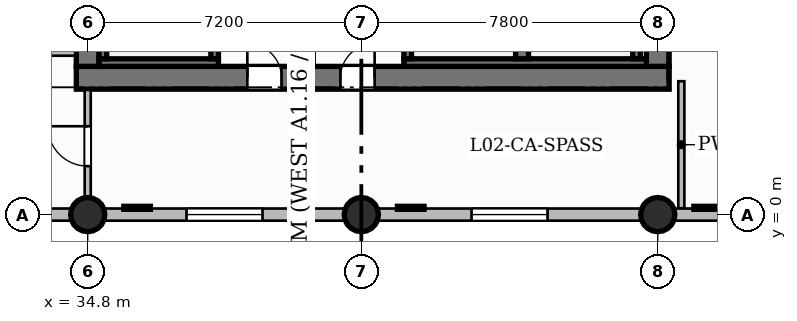
"""IFC4 building model, lengths in metres.
Left out: names, types, materials, properties, quantities, classifications, styles, units other than length and angle.
Written with IfcOpenShell. Run it as: python <this file> out.ifc"""

import sys

from ifc_helpers import new_model, si_unit, direction, frame, frame_2d, origin, origin_2d, place, context, subcontext, project, spatial, rectangle, circle, extrude, source, transform, mapped, element, fill, save


model = new_model("IFC4")
c1 = context("Model", 3, precision=1e-05, world=origin(), true_north=direction((0.0, 1.0)))
c2 = subcontext(c1, "Body", "Model", "MODEL_VIEW")
j1 = project(units=[si_unit("LENGTHUNIT", "METRE"), si_unit("PLANEANGLEUNIT", "RADIAN")], contexts=[c1])
p1 = place(None, origin())
s1 = spatial("IfcSite", under=j1, at=p1, CompositionType="ELEMENT")
p2 = place(p1, origin())
s2 = spatial("IfcBuilding", under=s1, at=p2, CompositionType="ELEMENT")
p3 = place(p2, frame((0.0, 0.0, 10.8)))
s3 = spatial("IfcBuildingStorey", under=s2, at=p3, CompositionType="ELEMENT", Elevation=10.8)
p4 = place(p3, frame((34.5, 3.6, 0.0), z_axis=(0.0, 0.0, 1.0), x_axis=(1.0, 0.0, 0.0)))
e1 = element("IfcWall", 1, at=p4, inside=s3, PredefinedType="SHEAR", context=c2, shape_type="SweptSolid", body=[
    extrude(rectangle(XDim=15.6, YDim=0.6, at=frame_2d((7.8, 0.0))), origin(), (0.0, 0.0, 1.0), 5.4),
])
p5 = place(p4, frame((4.5, 0.0, 0.0)))
e2 = element("IfcOpeningElement", 2, at=p5, cuts=e1, PredefinedType="OPENING", context=c2, shape_type="SweptSolid", body=[
    extrude(rectangle(XDim=0.9, YDim=2.1, at=frame_2d((0.45, 1.05))), frame((0.0, 0.31, 0.0), z_axis=(0.0, -1.0, 0.0), x_axis=(1.0, 0.0, 0.0)), (0.0, 0.0, 1.0), 0.62),
])
p6 = place(p4, frame((6.95, 0.0, 0.0)))
e3 = element("IfcOpeningElement", 3, at=p6, cuts=e1, PredefinedType="OPENING", context=c2, shape_type="SweptSolid", body=[
    extrude(rectangle(XDim=0.9, YDim=2.1, at=frame_2d((0.45, 1.05))), frame((0.0, 0.31, 0.0), z_axis=(0.0, -1.0, 0.0), x_axis=(1.0, 0.0, 0.0)), (0.0, 0.0, 1.0), 0.62),
])
for number, where, z_axis, x_axis in (
    (4, (34.8, 3.9, 0.0), (0.0, 0.0, 1.0), (0.0, 1.0, 0.0)),
    (5, (49.8, 3.9, 0.0), (0.0, 0.0, 1.0), (0.0, 1.0, 0.0)),
):
    element("IfcWall", number, at=place(p3, frame(where, z_axis=z_axis, x_axis=x_axis)), inside=s3, PredefinedType="SHEAR", context=c2, shape_type="SweptSolid", body=[
        extrude(rectangle(XDim=10.2, YDim=0.6, at=frame_2d((5.1, 0.0))), origin(), (0.0, 0.0, 1.0), 5.4),
    ])
m1 = source(origin(), c2, "Body", "SweptSolid", [
    extrude(circle(Radius=0.45, at=origin_2d()), origin(), (0.0, 0.0, 1.0), 5.4),
])
for number, where, z_axis, x_axis in (
    (6, (34.8, 0.0, 0.0), (0.0, 0.0, 1.0), (1.0, 0.0, 0.0)),
    (7, (42.0, 0.0, 0.0), (0.0, 0.0, 1.0), (1.0, 0.0, 0.0)),
    (8, (49.8, 0.0, 0.0), (0.0, 0.0, 1.0), (1.0, 0.0, 0.0)),
):
    element("IfcColumn", number, at=place(p3, frame(where, z_axis=z_axis, x_axis=x_axis)), inside=s3, PredefinedType="COLUMN", context=c2, shape_type="MappedRepresentation", body=[
        mapped(m1, transform((0.0, 0.0, 0.0), scale=1.0)),
    ])
p7 = place(p3, frame((35.1, 4.0, 0.0), z_axis=(0.0, 0.0, 1.0), x_axis=(1.0, 0.0, 0.0)))
e9 = element("IfcWall", 9, at=p7, inside=s3, PredefinedType="SHEAR", context=c2, shape_type="SweptSolid", body=[
    extrude(rectangle(XDim=3.14, YDim=0.2, at=frame_2d((1.57, 0.0))), origin(), (0.0, 0.0, 1.0), 5.4),
])
for number, where, z_axis, x_axis in (
    (10, (35.2, 4.1, 0.0), (0.0, 0.0, 1.0), (0.0, 1.0, 0.0)),
    (11, (38.14, 4.1, 0.0), (0.0, 0.0, 1.0), (0.0, 1.0, 0.0)),
):
    element("IfcWall", number, at=place(p3, frame(where, z_axis=z_axis, x_axis=x_axis)), inside=s3, PredefinedType="SHEAR", context=c2, shape_type="SweptSolid", body=[
        extrude(rectangle(XDim=6.95, YDim=0.2, at=frame_2d((3.475, 0.0))), origin(), (0.0, 0.0, 1.0), 5.4),
    ])
p8 = place(p3, frame((43.12, 4.0, 0.0), z_axis=(0.0, 0.0, 1.0), x_axis=(1.0, 0.0, 0.0)))
e12 = element("IfcWall", 12, at=p8, inside=s3, PredefinedType="SHEAR", context=c2, shape_type="SweptSolid", body=[
    extrude(rectangle(XDim=6.38, YDim=0.2, at=frame_2d((3.19, 0.0))), origin(), (0.0, 0.0, 1.0), 5.4),
])
p9 = place(p3, frame((43.22, 4.1, 0.0), z_axis=(0.0, 0.0, 1.0), x_axis=(0.0, 1.0, 0.0)))
e13 = element("IfcWall", 13, at=p9, inside=s3, PredefinedType="SHEAR", context=c2, shape_type="SweptSolid", body=[
    extrude(rectangle(XDim=6.95, YDim=0.2, at=frame_2d((3.475, 0.0))), origin(), (0.0, 0.0, 1.0), 5.4),
])
p10 = place(p3, frame((46.23, 4.1, 0.0), z_axis=(0.0, 0.0, 1.0), x_axis=(0.0, 1.0, 0.0)))
e14 = element("IfcWall", 14, at=p10, inside=s3, PredefinedType="SHEAR", context=c2, shape_type="SweptSolid", body=[
    extrude(rectangle(XDim=6.95, YDim=0.34, at=frame_2d((3.475, 0.0))), origin(), (0.0, 0.0, 1.0), 5.4),
])
p11 = place(p3, frame((49.24, 4.1, 0.0), z_axis=(0.0, 0.0, 1.0), x_axis=(0.0, 1.0, 0.0)))
e15 = element("IfcWall", 15, at=p11, inside=s3, PredefinedType="SHEAR", context=c2, shape_type="SweptSolid", body=[
    extrude(rectangle(XDim=6.95, YDim=0.2, at=frame_2d((3.475, 0.0))), origin(), (0.0, 0.0, 1.0), 5.4),
])
p12 = place(p3, frame((40.7, 3.92, 0.0), z_axis=(0.0, 0.0, 1.0), x_axis=(0.0, 1.0, 0.0)))
e16 = element("IfcWall", 16, at=p12, inside=s3, PredefinedType="PARTITIONING", context=c2, shape_type="SweptSolid", body=[
    extrude(rectangle(XDim=3.99, YDim=0.14, at=frame_2d((1.995, 0.0))), origin(), (0.0, 0.0, 1.0), 5.1),
])
p13 = place(p3, frame((32.16, 4.28, 0.0), z_axis=(0.0, 0.0, 1.0), x_axis=(1.0, 0.0, 0.0)))
e17 = element("IfcWall", 17, at=p13, inside=s3, PredefinedType="PARTITIONING", context=c2, shape_type="SweptSolid", body=[
    extrude(rectangle(XDim=2.31, YDim=0.2, at=frame_2d((1.155, 0.0))), origin(), (0.0, 0.0, 1.0), 5.1),
])
p14 = place(p3, frame((34.8, 0.32, 0.0), z_axis=(0.0, 0.0, 1.0), x_axis=(0.0, 1.0, 0.0)))
e18 = element("IfcWall", 18, at=p14, inside=s3, PredefinedType="PARTITIONING", context=c2, shape_type="SweptSolid", body=[
    extrude(rectangle(XDim=2.96, YDim=0.16, at=frame_2d((1.48, 0.0))), origin(), (0.0, 0.0, 1.0), 5.1),
])
p15 = place(p14, frame((0.955, 0.0, 0.0)))
e19 = element("IfcOpeningElement", 19, at=p15, cuts=e18, PredefinedType="OPENING", context=c2, shape_type="SweptSolid", body=[
    extrude(rectangle(XDim=1.05, YDim=2.15, at=frame_2d((0.525, 1.075))), frame((0.0, 0.09, 0.0), z_axis=(0.0, -1.0, 0.0), x_axis=(1.0, 0.0, 0.0)), (0.0, 0.0, 1.0), 0.18),
])
p16 = place(p3, frame((50.42, 0.168, 0.0), z_axis=(0.0, 0.0, 1.0), x_axis=(0.0, 1.0, 0.0)))
e20 = element("IfcWall", 20, at=p16, inside=s3, PredefinedType="PARTITIONING", context=c2, shape_type="SweptSolid", body=[
    extrude(rectangle(XDim=3.342, YDim=0.16, at=frame_2d((1.671, 0.0))), origin(), (0.0, 0.0, 1.0), 5.1),
])
p17 = place(p3, frame((28.35, 0.0, 0.0), z_axis=(0.0, 0.0, 1.0), x_axis=(1.0, 0.0, 0.0)))
e21 = element("IfcWall", 21, at=p17, inside=s3, PredefinedType="SOLIDWALL", context=c2, shape_type="SweptSolid", body=[
    extrude(rectangle(XDim=52.05, YDim=0.32, at=frame_2d((26.025, 0.0))), origin(), (0.0, 0.0, 1.0), 4.185),
])
p18 = place(p17, frame((2.45, 0.0, 0.75)))
e22 = element("IfcOpeningElement", 22, at=p18, cuts=e21, PredefinedType="OPENING", context=c2, shape_type="SweptSolid", body=[
    extrude(rectangle(XDim=2.0, YDim=2.6, at=frame_2d((1.0, 1.3))), frame((0.0, 0.17, 0.0), z_axis=(0.0, -1.0, 0.0), x_axis=(1.0, 0.0, 0.0)), (0.0, 0.0, 1.0), 0.34),
])
p19 = place(p17, frame((9.05, 0.0, 0.75)))
e23 = element("IfcOpeningElement", 23, at=p19, cuts=e21, PredefinedType="OPENING", context=c2, shape_type="SweptSolid", body=[
    extrude(rectangle(XDim=2.0, YDim=2.6, at=frame_2d((1.0, 1.3))), frame((0.0, 0.17, 0.0), z_axis=(0.0, -1.0, 0.0), x_axis=(1.0, 0.0, 0.0)), (0.0, 0.0, 1.0), 0.34),
])
p20 = place(p17, frame((16.55, 0.0, 0.75)))
e24 = element("IfcOpeningElement", 24, at=p20, cuts=e21, PredefinedType="OPENING", context=c2, shape_type="SweptSolid", body=[
    extrude(rectangle(XDim=2.0, YDim=2.6, at=frame_2d((1.0, 1.3))), frame((0.0, 0.17, 0.0), z_axis=(0.0, -1.0, 0.0), x_axis=(1.0, 0.0, 0.0)), (0.0, 0.0, 1.0), 0.34),
])
p21 = place(p17, frame((24.35, 0.0, 0.75)))
e25 = element("IfcOpeningElement", 25, at=p21, cuts=e21, PredefinedType="OPENING", context=c2, shape_type="SweptSolid", body=[
    extrude(rectangle(XDim=2.0, YDim=2.6, at=frame_2d((1.0, 1.3))), frame((0.0, 0.17, 0.0), z_axis=(0.0, -1.0, 0.0), x_axis=(1.0, 0.0, 0.0)), (0.0, 0.0, 1.0), 0.34),
])
p22 = place(p17, frame((34.35, 0.0, 0.75)))
e26 = element("IfcOpeningElement", 26, at=p22, cuts=e21, PredefinedType="OPENING", context=c2, shape_type="SweptSolid", body=[
    extrude(rectangle(XDim=2.0, YDim=2.6, at=frame_2d((1.0, 1.3))), frame((0.0, 0.17, 0.0), z_axis=(0.0, -1.0, 0.0), x_axis=(1.0, 0.0, 0.0)), (0.0, 0.0, 1.0), 0.34),
])
p23 = place(p17, frame((41.75, 0.0, 0.75)))
e27 = element("IfcOpeningElement", 27, at=p23, cuts=e21, PredefinedType="OPENING", context=c2, shape_type="SweptSolid", body=[
    extrude(rectangle(XDim=2.0, YDim=2.6, at=frame_2d((1.0, 1.3))), frame((0.0, 0.17, 0.0), z_axis=(0.0, -1.0, 0.0), x_axis=(1.0, 0.0, 0.0)), (0.0, 0.0, 1.0), 0.34),
])
p24 = place(p17, frame((47.15, 0.0, 0.75)))
e28 = element("IfcOpeningElement", 28, at=p24, cuts=e21, PredefinedType="OPENING", context=c2, shape_type="SweptSolid", body=[
    extrude(rectangle(XDim=2.0, YDim=2.6, at=frame_2d((1.0, 1.3))), frame((0.0, 0.17, 0.0), z_axis=(0.0, -1.0, 0.0), x_axis=(1.0, 0.0, 0.0)), (0.0, 0.0, 1.0), 0.34),
])
m2 = source(origin(), c2, "Body", "SweptSolid", [
    extrude(rectangle(XDim=0.9, YDim=2.1, at=frame_2d((0.45, 1.05))), frame((0.0, 0.025, 0.0), z_axis=(0.0, -1.0, 0.0), x_axis=(1.0, 0.0, 0.0)), (0.0, 0.0, 1.0), 0.05),
])
p25 = place(p5, origin())
e29 = element("IfcDoor", 29, at=p25, inside=s3, OperationType="SINGLE_SWING_LEFT", PredefinedType="DOOR", context=c2, shape_type="MappedRepresentation", body=[
    mapped(m2, transform((0.0, 0.0, 0.0), scale=1.0)),
])
fill(e2, e29)
p26 = place(p6, origin())
e30 = element("IfcDoor", 30, at=p26, inside=s3, OperationType="SINGLE_SWING_RIGHT", PredefinedType="DOOR", context=c2, shape_type="MappedRepresentation", body=[
    mapped(m2, transform((0.0, 0.0, 0.0), scale=1.0)),
])
fill(e3, e30)
m3 = source(origin(), c2, "Body", "SweptSolid", [
    extrude(rectangle(XDim=1.05, YDim=2.15, at=frame_2d((0.525, 1.075))), frame((0.0, 0.025, 0.0), z_axis=(0.0, -1.0, 0.0), x_axis=(1.0, 0.0, 0.0)), (0.0, 0.0, 1.0), 0.05),
])
p27 = place(p15, origin())
e31 = element("IfcDoor", 31, at=p27, inside=s3, OperationType="SINGLE_SWING_RIGHT", PredefinedType="DOOR", context=c2, shape_type="MappedRepresentation", body=[
    mapped(m3, transform((0.0, 0.0, 0.0), scale=1.0)),
])
fill(e19, e31)
m4 = source(origin(), c2, "Body", "SweptSolid", [
    extrude(rectangle(XDim=2.0, YDim=2.6, at=frame_2d((1.0, 1.3))), frame((0.0, 0.03, 0.0), z_axis=(0.0, -1.0, 0.0), x_axis=(1.0, 0.0, 0.0)), (0.0, 0.0, 1.0), 0.06),
])
p28 = place(p19, origin())
e32 = element("IfcWindow", 32, at=p28, inside=s3, PartitioningType="DOUBLE_PANEL_VERTICAL", PredefinedType="WINDOW", context=c2, shape_type="MappedRepresentation", body=[
    mapped(m4, transform((0.0, 0.0, 0.0), scale=1.0)),
])
fill(e23, e32)
p29 = place(p20, origin())
e33 = element("IfcWindow", 33, at=p29, inside=s3, PartitioningType="DOUBLE_PANEL_VERTICAL", PredefinedType="WINDOW", context=c2, shape_type="MappedRepresentation", body=[
    mapped(m4, transform((0.0, 0.0, 0.0), scale=1.0)),
])
fill(e24, e33)
save(model, sys.argv[1])
